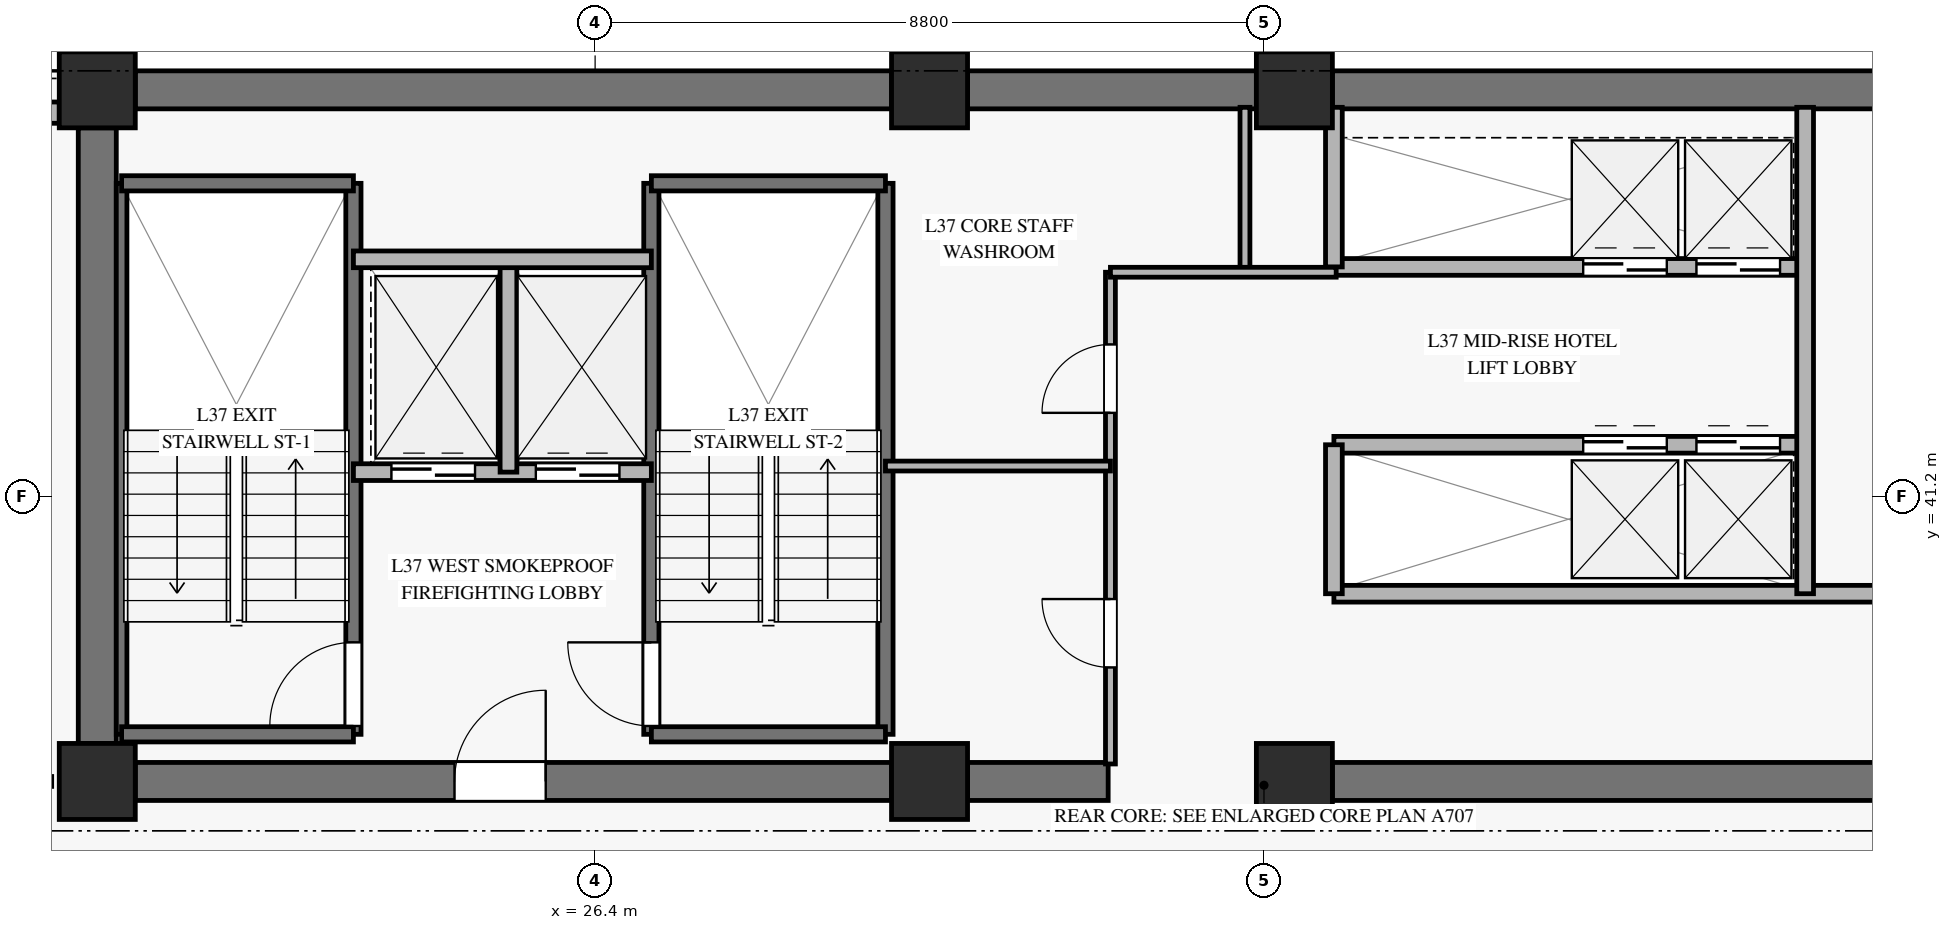
"""IFC4 building model, lengths in metres.
Left out: names, types, materials, properties, quantities, classifications, styles, units other than length and angle.
Written with IfcOpenShell. Run it as: python <this file> out.ifc"""

import sys

from ifc_helpers import new_model, si_unit, direction, frame, frame_2d, origin, origin_2d, place, context, subcontext, project, spatial, rectangle, extrude, source, transform, mapped, element, fill, save


model = new_model("IFC4")
c1 = context("Model", 3, precision=1e-05, world=origin(), true_north=direction((0.0, 1.0)))
c2 = subcontext(c1, "Body", "Model", "MODEL_VIEW")
j1 = project(units=[si_unit("LENGTHUNIT", "METRE"), si_unit("PLANEANGLEUNIT", "RADIAN")], contexts=[c1])
p1 = place(None, origin())
s1 = spatial("IfcSite", under=j1, at=p1, CompositionType="ELEMENT")
p2 = place(p1, origin())
s2 = spatial("IfcBuilding", under=s1, at=p2, CompositionType="ELEMENT")
p3 = place(p2, frame((0.0, 0.0, 152.7)))
s3 = spatial("IfcBuildingStorey", under=s2, at=p3, CompositionType="ELEMENT", Elevation=152.7)
m1 = source(origin(), c2, "Body", "SweptSolid", [
    extrude(rectangle(XDim=1.0, YDim=1.0, at=origin_2d()), origin(), (0.0, 0.0, 1.0), 3.27),
])
for number, where, z_axis, x_axis in (
    (1, (19.85, 37.45, 0.0), (0.0, 0.0, 1.0), (1.0, 0.0, 0.0)),
    (2, (19.85, 46.55, 0.0), (0.0, 0.0, 1.0), (1.0, 0.0, 0.0)),
    (3, (30.8, 37.45, 0.0), (0.0, 0.0, 1.0), (1.0, 0.0, 0.0)),
    (4, (30.8, 46.55, 0.0), (0.0, 0.0, 1.0), (1.0, 0.0, 0.0)),
    (5, (35.6, 37.45, 0.0), (0.0, 0.0, 1.0), (1.0, 0.0, 0.0)),
    (6, (35.6, 46.55, 0.0), (0.0, 0.0, 1.0), (1.0, 0.0, 0.0)),
):
    element("IfcColumn", number, at=place(p3, frame(where, z_axis=z_axis, x_axis=x_axis)), inside=s3, PredefinedType="PILASTER", context=c2, shape_type="MappedRepresentation", body=[
        mapped(m1, transform((0.0, 0.0, 0.0), x_axis=(1.0, 0.0, 0.0), y_axis=(0.0, 1.0, 0.0), z_axis=(0.0, 0.0, 1.0), scale=1.0)),
    ])
p4 = place(p3, frame((20.35, 46.55, 0.0), z_axis=(0.0, 0.0, 1.0), x_axis=(1.0, 0.0, 0.0)))
e7 = element("IfcWall", 7, at=p4, inside=s3, PredefinedType="SHEAR", context=c2, shape_type="SweptSolid", body=[
    extrude(rectangle(XDim=9.95, YDim=0.5, at=frame_2d((4.975, 0.0))), origin(), (0.0, 0.0, 1.0), 3.27),
])
p5 = place(p3, frame((31.3, 46.55, 0.0), z_axis=(0.0, 0.0, 1.0), x_axis=(1.0, 0.0, 0.0)))
e8 = element("IfcWall", 8, at=p5, inside=s3, PredefinedType="SHEAR", context=c2, shape_type="SweptSolid", body=[
    extrude(rectangle(XDim=3.8, YDim=0.5, at=frame_2d((1.9, 0.0))), origin(), (0.0, 0.0, 1.0), 3.27),
])
p6 = place(p3, frame((36.1, 46.55, 0.0), z_axis=(0.0, 0.0, 1.0), x_axis=(1.0, 0.0, 0.0)))
e9 = element("IfcWall", 9, at=p6, inside=s3, PredefinedType="SHEAR", context=c2, shape_type="SweptSolid", body=[
    extrude(rectangle(XDim=7.7, YDim=0.5, at=frame_2d((3.85, 0.0))), origin(), (0.0, 0.0, 1.0), 3.27),
])
p7 = place(p3, frame((20.35, 37.45, 0.0), z_axis=(0.0, 0.0, 1.0), x_axis=(1.0, 0.0, 0.0)))
e10 = element("IfcWall", 10, at=p7, inside=s3, PredefinedType="SHEAR", context=c2, shape_type="SweptSolid", body=[
    extrude(rectangle(XDim=9.95, YDim=0.5, at=frame_2d((4.975, 0.0))), origin(), (0.0, 0.0, 1.0), 3.27),
])
p8 = place(p7, frame((4.2, 0.0, 0.0)))
e11 = element("IfcOpeningElement", 11, at=p8, cuts=e10, PredefinedType="OPENING", context=c2, shape_type="SweptSolid", body=[
    extrude(rectangle(XDim=1.2, YDim=2.15, at=frame_2d((0.6, 1.075))), frame((0.0, 0.26, 0.0), z_axis=(0.0, -1.0, 0.0), x_axis=(1.0, 0.0, 0.0)), (0.0, 0.0, 1.0), 0.52),
])
p9 = place(p3, frame((31.3, 37.45, 0.0), z_axis=(0.0, 0.0, 1.0), x_axis=(1.0, 0.0, 0.0)))
e12 = element("IfcWall", 12, at=p9, inside=s3, PredefinedType="SHEAR", context=c2, shape_type="SweptSolid", body=[
    extrude(rectangle(XDim=1.85, YDim=0.5, at=frame_2d((0.925, 0.0))), origin(), (0.0, 0.0, 1.0), 3.27),
])
p10 = place(p3, frame((36.1, 37.45, 0.0), z_axis=(0.0, 0.0, 1.0), x_axis=(1.0, 0.0, 0.0)))
e13 = element("IfcWall", 13, at=p10, inside=s3, PredefinedType="SHEAR", context=c2, shape_type="SweptSolid", body=[
    extrude(rectangle(XDim=7.7, YDim=0.5, at=frame_2d((3.85, 0.0))), origin(), (0.0, 0.0, 1.0), 3.27),
])
p11 = place(p3, frame((19.85, 37.95, 0.0), z_axis=(0.0, 0.0, 1.0), x_axis=(0.0, 1.0, 0.0)))
e14 = element("IfcWall", 14, at=p11, inside=s3, PredefinedType="SHEAR", context=c2, shape_type="SweptSolid", body=[
    extrude(rectangle(XDim=8.1, YDim=0.5, at=frame_2d((4.05, 0.0))), origin(), (0.0, 0.0, 1.0), 3.27),
])
p12 = place(p3, frame((8.788, 46.25, 0.0), z_axis=(0.0, 0.0, 1.0), x_axis=(1.0, 0.0, 0.0)))
e15 = element("IfcWall", 15, at=p12, inside=s3, PredefinedType="SOLIDWALL", context=c2, shape_type="SweptSolid", body=[
    extrude(rectangle(XDim=10.562, YDim=0.28, at=frame_2d((5.281, 0.0))), origin(), (0.0, 0.0, 1.0), 2.75),
])
p13 = place(p12, frame((4.481, 0.0, 0.45)))
e16 = element("IfcOpeningElement", 16, at=p13, cuts=e15, PredefinedType="OPENING", context=c2, shape_type="SweptSolid", body=[
    extrude(rectangle(XDim=1.6, YDim=2.0, at=frame_2d((0.8, 1.0))), frame((0.0, 0.15, 0.0), z_axis=(0.0, -1.0, 0.0), x_axis=(1.0, 0.0, 0.0)), (0.0, 0.0, 1.0), 0.3),
])
p14 = place(p3, frame((20.17, 38.07, 0.0), z_axis=(0.0, 0.0, 1.0), x_axis=(0.0, 1.0, 0.0)))
e17 = element("IfcWall", 17, at=p14, inside=s3, PredefinedType="SOLIDWALL", context=c2, shape_type="SweptSolid", body=[
    extrude(rectangle(XDim=7.25, YDim=0.14, at=frame_2d((3.625, 0.0))), origin(), (0.0, 0.0, 1.0), 3.5),
])
p15 = place(p3, frame((23.22, 38.07, 0.0), z_axis=(0.0, 0.0, 1.0), x_axis=(0.0, 1.0, 0.0)))
e18 = element("IfcWall", 18, at=p15, inside=s3, PredefinedType="SOLIDWALL", context=c2, shape_type="SweptSolid", body=[
    extrude(rectangle(XDim=7.25, YDim=0.2, at=frame_2d((3.625, 0.0))), origin(), (0.0, 0.0, 1.0), 3.5),
])
p16 = place(p15, frame((0.11, 0.0, 0.0)))
e19 = element("IfcOpeningElement", 19, at=p16, cuts=e18, PredefinedType="OPENING", context=c2, shape_type="SweptSolid", body=[
    extrude(rectangle(XDim=1.1, YDim=2.15, at=frame_2d((0.55, 1.075))), frame((0.0, 0.11, 0.0), z_axis=(0.0, -1.0, 0.0), x_axis=(1.0, 0.0, 0.0)), (0.0, 0.0, 1.0), 0.22),
])
for number, where, z_axis, x_axis in (
    (20, (20.17, 45.32, 0.0), (0.0, 0.0, 1.0), (1.0, 0.0, 0.0)),
    (21, (20.17, 38.07, 0.0), (0.0, 0.0, 1.0), (1.0, 0.0, 0.0)),
):
    element("IfcWall", number, at=place(p3, frame(where, z_axis=z_axis, x_axis=x_axis)), inside=s3, PredefinedType="SOLIDWALL", context=c2, shape_type="SweptSolid", body=[
        extrude(rectangle(XDim=3.05, YDim=0.2, at=frame_2d((1.525, 0.0))), origin(), (0.0, 0.0, 1.0), 3.5),
    ])
p17 = place(p3, frame((27.14, 38.07, 0.0), z_axis=(0.0, 0.0, 1.0), x_axis=(0.0, 1.0, 0.0)))
e22 = element("IfcWall", 22, at=p17, inside=s3, PredefinedType="SOLIDWALL", context=c2, shape_type="SweptSolid", body=[
    extrude(rectangle(XDim=7.25, YDim=0.2, at=frame_2d((3.625, 0.0))), origin(), (0.0, 0.0, 1.0), 3.5),
])
p18 = place(p17, frame((0.11, 0.0, 0.0)))
e23 = element("IfcOpeningElement", 23, at=p18, cuts=e22, PredefinedType="OPENING", context=c2, shape_type="SweptSolid", body=[
    extrude(rectangle(XDim=1.1, YDim=2.15, at=frame_2d((0.55, 1.075))), frame((0.0, 0.11, 0.0), z_axis=(0.0, -1.0, 0.0), x_axis=(1.0, 0.0, 0.0)), (0.0, 0.0, 1.0), 0.22),
])
p19 = place(p3, frame((30.22, 38.07, 0.0), z_axis=(0.0, 0.0, 1.0), x_axis=(0.0, 1.0, 0.0)))
e24 = element("IfcWall", 24, at=p19, inside=s3, PredefinedType="SOLIDWALL", context=c2, shape_type="SweptSolid", body=[
    extrude(rectangle(XDim=7.25, YDim=0.2, at=frame_2d((3.625, 0.0))), origin(), (0.0, 0.0, 1.0), 3.5),
])
for number, where, z_axis, x_axis in (
    (25, (27.14, 45.32, 0.0), (0.0, 0.0, 1.0), (1.0, 0.0, 0.0)),
    (26, (27.14, 38.07, 0.0), (0.0, 0.0, 1.0), (1.0, 0.0, 0.0)),
):
    element("IfcWall", number, at=place(p3, frame(where, z_axis=z_axis, x_axis=x_axis)), inside=s3, PredefinedType="SOLIDWALL", context=c2, shape_type="SweptSolid", body=[
        extrude(rectangle(XDim=3.08, YDim=0.2, at=frame_2d((1.54, 0.0))), origin(), (0.0, 0.0, 1.0), 3.5),
    ])
p20 = place(p3, frame((23.22, 41.52, 0.0), z_axis=(0.0, 0.0, 1.0), x_axis=(1.0, 0.0, 0.0)))
e27 = element("IfcWall", 27, at=p20, inside=s3, PredefinedType="SOLIDWALL", context=c2, shape_type="SweptSolid", body=[
    extrude(rectangle(XDim=3.92, YDim=0.22, at=frame_2d((1.96, 0.0))), origin(), (0.0, 0.0, 1.0), 3.27),
])
p21 = place(p20, frame((0.5, 0.0, 0.0)))
e28 = element("IfcOpeningElement", 28, at=p21, cuts=e27, PredefinedType="OPENING", context=c2, shape_type="SweptSolid", body=[
    extrude(rectangle(XDim=1.1, YDim=2.2, at=frame_2d((0.55, 1.1))), frame((0.0, 0.12, 0.0), z_axis=(0.0, -1.0, 0.0), x_axis=(1.0, 0.0, 0.0)), (0.0, 0.0, 1.0), 0.24),
])
p22 = place(p20, frame((2.4, 0.0, 0.0)))
e29 = element("IfcOpeningElement", 29, at=p22, cuts=e27, PredefinedType="OPENING", context=c2, shape_type="SweptSolid", body=[
    extrude(rectangle(XDim=1.1, YDim=2.2, at=frame_2d((0.55, 1.1))), frame((0.0, 0.12, 0.0), z_axis=(0.0, -1.0, 0.0), x_axis=(1.0, 0.0, 0.0)), (0.0, 0.0, 1.0), 0.24),
])
p23 = place(p3, frame((25.26, 41.52, 0.0), z_axis=(0.0, 0.0, 1.0), x_axis=(0.0, 1.0, 0.0)))
e30 = element("IfcWall", 30, at=p23, inside=s3, PredefinedType="SOLIDWALL", context=c2, shape_type="SweptSolid", body=[
    extrude(rectangle(XDim=2.8, YDim=0.22, at=frame_2d((1.4, 0.0))), origin(), (0.0, 0.0, 1.0), 3.27),
])
p24 = place(p3, frame((23.22, 44.32, 0.0), z_axis=(0.0, 0.0, 1.0), x_axis=(1.0, 0.0, 0.0)))
e31 = element("IfcWall", 31, at=p24, inside=s3, PredefinedType="SOLIDWALL", context=c2, shape_type="SweptSolid", body=[
    extrude(rectangle(XDim=3.92, YDim=0.22, at=frame_2d((1.96, 0.0))), origin(), (0.0, 0.0, 1.0), 3.27),
])
p25 = place(p3, frame((36.12, 44.22, 0.0), z_axis=(0.0, 0.0, 1.0), x_axis=(1.0, 0.0, 0.0)))
e32 = element("IfcWall", 32, at=p25, inside=s3, PredefinedType="SOLIDWALL", context=c2, shape_type="SweptSolid", body=[
    extrude(rectangle(XDim=6.2, YDim=0.22, at=frame_2d((3.1, 0.0))), origin(), (0.0, 0.0, 1.0), 3.27),
])
p26 = place(p25, frame((3.28, 0.0, 0.0)))
e33 = element("IfcOpeningElement", 33, at=p26, cuts=e32, PredefinedType="OPENING", context=c2, shape_type="SweptSolid", body=[
    extrude(rectangle(XDim=1.1, YDim=2.2, at=frame_2d((0.55, 1.1))), frame((0.0, 0.12, 0.0), z_axis=(0.0, -1.0, 0.0), x_axis=(1.0, 0.0, 0.0)), (0.0, 0.0, 1.0), 0.24),
])
p27 = place(p25, frame((4.77, 0.0, 0.0)))
e34 = element("IfcOpeningElement", 34, at=p27, cuts=e32, PredefinedType="OPENING", context=c2, shape_type="SweptSolid", body=[
    extrude(rectangle(XDim=1.1, YDim=2.2, at=frame_2d((0.55, 1.1))), frame((0.0, 0.12, 0.0), z_axis=(0.0, -1.0, 0.0), x_axis=(1.0, 0.0, 0.0)), (0.0, 0.0, 1.0), 0.24),
])
p28 = place(p3, frame((36.12, 41.88, 0.0), z_axis=(0.0, 0.0, 1.0), x_axis=(1.0, 0.0, 0.0)))
e35 = element("IfcWall", 35, at=p28, inside=s3, PredefinedType="SOLIDWALL", context=c2, shape_type="SweptSolid", body=[
    extrude(rectangle(XDim=6.2, YDim=0.22, at=frame_2d((3.1, 0.0))), origin(), (0.0, 0.0, 1.0), 3.27),
])
p29 = place(p28, frame((3.28, 0.0, 0.0)))
e36 = element("IfcOpeningElement", 36, at=p29, cuts=e35, PredefinedType="OPENING", context=c2, shape_type="SweptSolid", body=[
    extrude(rectangle(XDim=1.1, YDim=2.2, at=frame_2d((0.55, 1.1))), frame((0.0, 0.12, 0.0), z_axis=(0.0, -1.0, 0.0), x_axis=(1.0, 0.0, 0.0)), (0.0, 0.0, 1.0), 0.24),
])
p30 = place(p28, frame((4.77, 0.0, 0.0)))
e37 = element("IfcOpeningElement", 37, at=p30, cuts=e35, PredefinedType="OPENING", context=c2, shape_type="SweptSolid", body=[
    extrude(rectangle(XDim=1.1, YDim=2.2, at=frame_2d((0.55, 1.1))), frame((0.0, 0.12, 0.0), z_axis=(0.0, -1.0, 0.0), x_axis=(1.0, 0.0, 0.0)), (0.0, 0.0, 1.0), 0.24),
])
p31 = place(p3, frame((36.12, 39.92, 0.0), z_axis=(0.0, 0.0, 1.0), x_axis=(1.0, 0.0, 0.0)))
e38 = element("IfcWall", 38, at=p31, inside=s3, PredefinedType="SOLIDWALL", context=c2, shape_type="SweptSolid", body=[
    extrude(rectangle(XDim=8.6, YDim=0.22, at=frame_2d((4.3, 0.0))), origin(), (0.0, 0.0, 1.0), 2.555),
])
p32 = place(p3, frame((42.32, 39.92, 0.0), z_axis=(0.0, 0.0, 1.0), x_axis=(0.0, 1.0, 0.0)))
e39 = element("IfcWall", 39, at=p32, inside=s3, PredefinedType="SOLIDWALL", context=c2, shape_type="SweptSolid", body=[
    extrude(rectangle(XDim=6.4, YDim=0.22, at=frame_2d((3.2, 0.0))), origin(), (0.0, 0.0, 1.0), 3.27),
])
p33 = place(p3, frame((36.12, 39.92, 0.0), z_axis=(0.0, 0.0, 1.0), x_axis=(0.0, 1.0, 0.0)))
e40 = element("IfcWall", 40, at=p33, inside=s3, PredefinedType="SOLIDWALL", context=c2, shape_type="SweptSolid", body=[
    extrude(rectangle(XDim=1.96, YDim=0.22, at=frame_2d((0.98, 0.0))), origin(), (0.0, 0.0, 1.0), 3.27),
])
p34 = place(p3, frame((36.12, 44.22, 0.0), z_axis=(0.0, 0.0, 1.0), x_axis=(0.0, 1.0, 0.0)))
e41 = element("IfcWall", 41, at=p34, inside=s3, PredefinedType="SOLIDWALL", context=c2, shape_type="SweptSolid", body=[
    extrude(rectangle(XDim=2.1, YDim=0.22, at=frame_2d((1.05, 0.0))), origin(), (0.0, 0.0, 1.0), 3.27),
])
p35 = place(p3, frame((33.18, 37.68, 0.0), z_axis=(0.0, 0.0, 1.0), x_axis=(0.0, 1.0, 0.0)))
e42 = element("IfcWall", 42, at=p35, inside=s3, PredefinedType="PARTITIONING", context=c2, shape_type="SweptSolid", body=[
    extrude(rectangle(XDim=6.47, YDim=0.13, at=frame_2d((3.235, 0.0))), origin(), (0.0, 0.0, 1.0), 2.355),
])
p36 = place(p35, frame((1.27, 0.0, 0.0)))
e43 = element("IfcOpeningElement", 43, at=p36, cuts=e42, PredefinedType="OPENING", context=c2, shape_type="SweptSolid", body=[
    extrude(rectangle(XDim=0.9, YDim=2.1, at=frame_2d((0.45, 1.05))), frame((0.0, 0.075, 0.0), z_axis=(0.0, -1.0, 0.0), x_axis=(1.0, 0.0, 0.0)), (0.0, 0.0, 1.0), 0.15),
])
p37 = place(p35, frame((4.62, 0.0, 0.0)))
e44 = element("IfcOpeningElement", 44, at=p37, cuts=e42, PredefinedType="OPENING", context=c2, shape_type="SweptSolid", body=[
    extrude(rectangle(XDim=0.9, YDim=2.1, at=frame_2d((0.45, 1.05))), frame((0.0, 0.075, 0.0), z_axis=(0.0, -1.0, 0.0), x_axis=(1.0, 0.0, 0.0)), (0.0, 0.0, 1.0), 0.15),
])
p38 = place(p3, frame((34.95, 44.15, 0.0), z_axis=(0.0, 0.0, 1.0), x_axis=(0.0, 1.0, 0.0)))
e45 = element("IfcWall", 45, at=p38, inside=s3, PredefinedType="PARTITIONING", context=c2, shape_type="SweptSolid", body=[
    extrude(rectangle(XDim=2.17, YDim=0.13, at=frame_2d((1.085, 0.0))), origin(), (0.0, 0.0, 1.0), 3.27),
])
p39 = place(p3, frame((33.18, 44.15, 0.0), z_axis=(0.0, 0.0, 1.0), x_axis=(1.0, 0.0, 0.0)))
e46 = element("IfcWall", 46, at=p39, inside=s3, PredefinedType="PARTITIONING", context=c2, shape_type="SweptSolid", body=[
    extrude(rectangle(XDim=2.97, YDim=0.13, at=frame_2d((1.485, 0.0))), origin(), (0.0, 0.0, 1.0), 2.555),
])
p40 = place(p3, frame((30.22, 41.6, 0.0), z_axis=(0.0, 0.0, 1.0), x_axis=(1.0, 0.0, 0.0)))
e47 = element("IfcWall", 47, at=p40, inside=s3, PredefinedType="PARTITIONING", context=c2, shape_type="SweptSolid", body=[
    extrude(rectangle(XDim=2.96, YDim=0.13, at=frame_2d((1.48, 0.0))), origin(), (0.0, 0.0, 1.0), 2.555),
])
m2 = source(origin(), c2, "Body", "SweptSolid", [
    extrude(rectangle(XDim=1.1, YDim=2.15, at=frame_2d((0.55, 1.075))), frame((0.0, 0.025, 0.0), z_axis=(0.0, -1.0, 0.0), x_axis=(1.0, 0.0, 0.0)), (0.0, 0.0, 1.0), 0.05),
])
p41 = place(p16, origin())
e48 = element("IfcDoor", 48, at=p41, inside=s3, OperationType="SINGLE_SWING_LEFT", PredefinedType="DOOR", context=c2, shape_type="MappedRepresentation", body=[
    mapped(m2, transform((0.0, 0.0, 0.0), x_axis=(1.0, 0.0, 0.0), y_axis=(0.0, 1.0, 0.0), z_axis=(0.0, 0.0, 1.0), scale=1.0)),
])
fill(e19, e48)
p42 = place(p18, origin())
e49 = element("IfcDoor", 49, at=p42, inside=s3, OperationType="SINGLE_SWING_RIGHT", PredefinedType="DOOR", context=c2, shape_type="MappedRepresentation", body=[
    mapped(m2, transform((0.0, 0.0, 0.0), x_axis=(1.0, 0.0, 0.0), y_axis=(0.0, 1.0, 0.0), z_axis=(0.0, 0.0, 1.0), scale=1.0)),
])
fill(e23, e49)
m3 = source(origin(), c2, "Body", "SweptSolid", [
    extrude(rectangle(XDim=1.1, YDim=2.2, at=frame_2d((0.55, 1.1))), frame((0.0, 0.025, 0.0), z_axis=(0.0, -1.0, 0.0), x_axis=(1.0, 0.0, 0.0)), (0.0, 0.0, 1.0), 0.05),
])
p43 = place(p21, origin())
e50 = element("IfcDoor", 50, at=p43, inside=s3, OperationType="SLIDING_TO_LEFT", PredefinedType="DOOR", context=c2, shape_type="MappedRepresentation", body=[
    mapped(m3, transform((0.0, 0.0, 0.0), x_axis=(1.0, 0.0, 0.0), y_axis=(0.0, 1.0, 0.0), z_axis=(0.0, 0.0, 1.0), scale=1.0)),
])
fill(e28, e50)
p44 = place(p22, origin())
e51 = element("IfcDoor", 51, at=p44, inside=s3, OperationType="SLIDING_TO_LEFT", PredefinedType="DOOR", context=c2, shape_type="MappedRepresentation", body=[
    mapped(m3, transform((0.0, 0.0, 0.0), x_axis=(1.0, 0.0, 0.0), y_axis=(0.0, 1.0, 0.0), z_axis=(0.0, 0.0, 1.0), scale=1.0)),
])
fill(e29, e51)
m4 = source(origin(), c2, "Body", "SweptSolid", [
    extrude(rectangle(XDim=1.2, YDim=2.15, at=frame_2d((0.6, 1.075))), frame((0.0, 0.025, 0.0), z_axis=(0.0, -1.0, 0.0), x_axis=(1.0, 0.0, 0.0)), (0.0, 0.0, 1.0), 0.05),
])
p45 = place(p8, origin())
e52 = element("IfcDoor", 52, at=p45, inside=s3, OperationType="SINGLE_SWING_RIGHT", PredefinedType="DOOR", context=c2, shape_type="MappedRepresentation", body=[
    mapped(m4, transform((0.0, 0.0, 0.0), x_axis=(1.0, 0.0, 0.0), y_axis=(0.0, 1.0, 0.0), z_axis=(0.0, 0.0, 1.0), scale=1.0)),
])
fill(e11, e52)
p46 = place(p26, origin())
e53 = element("IfcDoor", 53, at=p46, inside=s3, OperationType="SLIDING_TO_LEFT", PredefinedType="DOOR", context=c2, shape_type="MappedRepresentation", body=[
    mapped(m3, transform((0.0, 0.0, 0.0), x_axis=(1.0, 0.0, 0.0), y_axis=(0.0, 1.0, 0.0), z_axis=(0.0, 0.0, 1.0), scale=1.0)),
])
fill(e33, e53)
p47 = place(p27, origin())
e54 = element("IfcDoor", 54, at=p47, inside=s3, OperationType="SLIDING_TO_LEFT", PredefinedType="DOOR", context=c2, shape_type="MappedRepresentation", body=[
    mapped(m3, transform((0.0, 0.0, 0.0), x_axis=(1.0, 0.0, 0.0), y_axis=(0.0, 1.0, 0.0), z_axis=(0.0, 0.0, 1.0), scale=1.0)),
])
fill(e34, e54)
p48 = place(p29, origin())
e55 = element("IfcDoor", 55, at=p48, inside=s3, OperationType="SLIDING_TO_LEFT", PredefinedType="DOOR", context=c2, shape_type="MappedRepresentation", body=[
    mapped(m3, transform((0.0, 0.0, 0.0), x_axis=(1.0, 0.0, 0.0), y_axis=(0.0, 1.0, 0.0), z_axis=(0.0, 0.0, 1.0), scale=1.0)),
])
fill(e36, e55)
p49 = place(p30, origin())
e56 = element("IfcDoor", 56, at=p49, inside=s3, OperationType="SLIDING_TO_LEFT", PredefinedType="DOOR", context=c2, shape_type="MappedRepresentation", body=[
    mapped(m3, transform((0.0, 0.0, 0.0), x_axis=(1.0, 0.0, 0.0), y_axis=(0.0, 1.0, 0.0), z_axis=(0.0, 0.0, 1.0), scale=1.0)),
])
fill(e37, e56)
m5 = source(origin(), c2, "Body", "SweptSolid", [
    extrude(rectangle(XDim=0.9, YDim=2.1, at=frame_2d((0.45, 1.05))), frame((0.0, 0.025, 0.0), z_axis=(0.0, -1.0, 0.0), x_axis=(1.0, 0.0, 0.0)), (0.0, 0.0, 1.0), 0.05),
])
p50 = place(p36, origin())
e57 = element("IfcDoor", 57, at=p50, inside=s3, OperationType="SINGLE_SWING_RIGHT", PredefinedType="DOOR", context=c2, shape_type="MappedRepresentation", body=[
    mapped(m5, transform((0.0, 0.0, 0.0), x_axis=(1.0, 0.0, 0.0), y_axis=(0.0, 1.0, 0.0), z_axis=(0.0, 0.0, 1.0), scale=1.0)),
])
fill(e43, e57)
p51 = place(p37, origin())
e58 = element("IfcDoor", 58, at=p51, inside=s3, OperationType="SINGLE_SWING_LEFT", PredefinedType="DOOR", context=c2, shape_type="MappedRepresentation", body=[
    mapped(m5, transform((0.0, 0.0, 0.0), x_axis=(1.0, 0.0, 0.0), y_axis=(0.0, 1.0, 0.0), z_axis=(0.0, 0.0, 1.0), scale=1.0)),
])
fill(e44, e58)
save(model, sys.argv[1])
